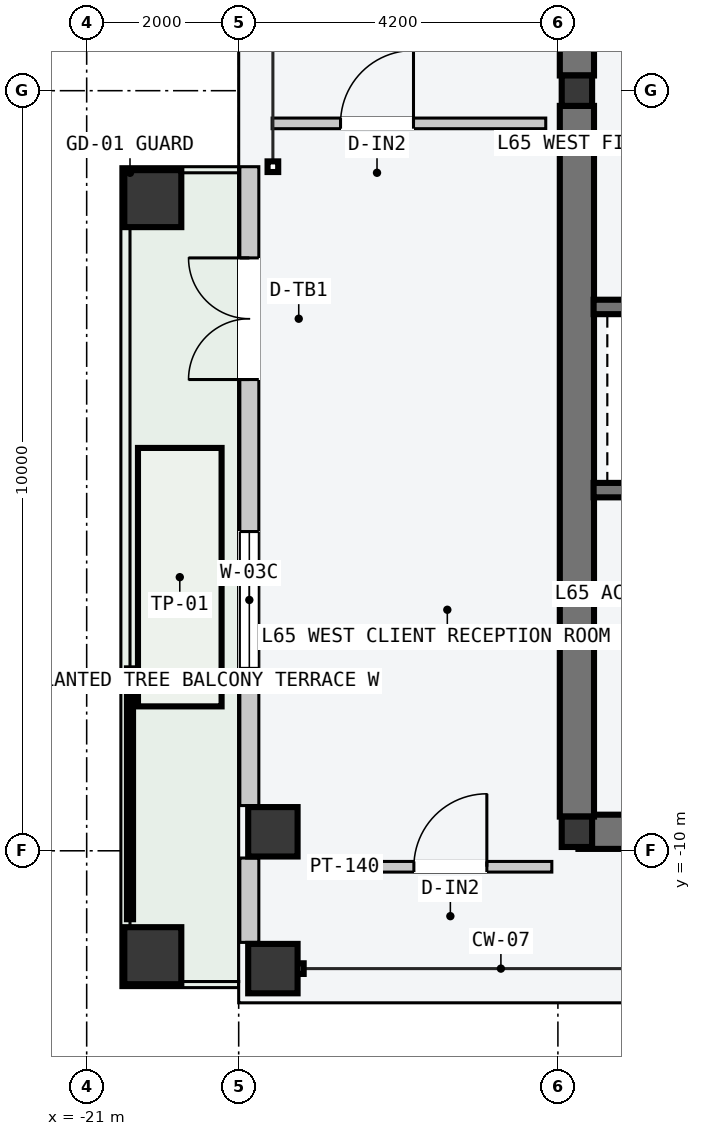
"""IFC4 building model, lengths in metres.
Left out: names, types, materials, properties, quantities, classifications, styles, units other than length and angle.
Written with IfcOpenShell. Run it as: python <this file> out.ifc"""

import sys

from ifc_helpers import new_model, si_unit, direction, frame, frame_2d, origin, origin_2d, place, context, subcontext, project, spatial, rectangle, hollow_rectangle, i_section, extrude, element, fill, save


model = new_model("IFC4")
c1 = context("Model", 3, precision=1e-05, world=origin(), true_north=direction((0.0, 1.0)))
c2 = subcontext(c1, "Body", "Model", "MODEL_VIEW")
j1 = project(units=[si_unit("LENGTHUNIT", "METRE"), si_unit("PLANEANGLEUNIT", "RADIAN")], contexts=[c1])
p1 = place(None, origin())
s1 = spatial("IfcSite", under=j1, at=p1, CompositionType="ELEMENT")
p2 = place(p1, origin())
s2 = spatial("IfcBuilding", under=s1, at=p2, CompositionType="ELEMENT")
p3 = place(p2, frame((0.0, 0.0, 247.2)))
s3 = spatial("IfcBuildingStorey", under=s2, at=p3, CompositionType="ELEMENT", Elevation=247.2)
p4 = place(p3, frame((-14.53, -9.75, -0.2), z_axis=(0.0, 0.0, 1.0), x_axis=(1.0, 0.0, 0.0)))
e1 = element("IfcWall", 1, at=p4, inside=s3, PredefinedType="SHEAR", context=c2, shape_type="SweptSolid", body=[
    extrude(rectangle(XDim=6.46, YDim=0.45, at=frame_2d((3.23, 0.0))), origin(), (0.0, 0.0, 1.0), 3.6),
])
for number, where, z_axis, x_axis in (
    (2, (-14.55, -9.55, -0.2), (0.0, 0.0, 1.0), (0.0, 1.0, 0.0)),
    (3, (-14.55, 0.2, -0.2), (0.0, 0.0, 1.0), (0.0, 1.0, 0.0)),
):
    element("IfcWall", number, at=place(p3, frame(where, z_axis=z_axis, x_axis=x_axis)), inside=s3, PredefinedType="SHEAR", context=c2, shape_type="SweptSolid", body=[
        extrude(rectangle(XDim=9.35, YDim=0.45, at=frame_2d((4.675, 0.0))), origin(), (0.0, 0.0, 1.0), 3.6),
    ])
for number, where, z_axis, x_axis in (
    (4, (-14.55, -9.75, 0.0), (0.0, 0.0, 1.0), (1.0, 0.0, 0.0)),
    (5, (-14.55, 0.0, 0.0), (0.0, 0.0, 1.0), (1.0, 0.0, 0.0)),
):
    element("IfcColumn", number, at=place(p3, frame(where, z_axis=z_axis, x_axis=x_axis)), inside=s3, PredefinedType="COLUMN", context=c2, shape_type="SweptSolid", body=[
        extrude(i_section(OverallWidth=0.4, OverallDepth=0.4, WebThickness=0.013, FlangeThickness=0.021, at=origin_2d()), origin(), (0.0, 0.0, 1.0), 3.6),
    ])
for number, where, z_axis, x_axis in (
    (6, (-18.55, -11.55, 0.0), (0.0, 0.0, 1.0), (0.0, 1.0, 0.0)),
    (7, (-18.55, -9.75, 0.0), (0.0, 0.0, 1.0), (0.0, 1.0, 0.0)),
):
    element("IfcColumn", number, at=place(p3, frame(where, z_axis=z_axis, x_axis=x_axis)), inside=s3, PredefinedType="COLUMN", context=c2, shape_type="SweptSolid", body=[
        extrude(hollow_rectangle(XDim=0.65, YDim=0.65, WallThickness=0.028, at=origin_2d()), origin(), (0.0, 0.0, 1.0), 3.6),
    ])
for number, where, z_axis, x_axis in (
    (8, (-20.13, -11.38, -0.2), (0.0, 0.0, 1.0), (0.0, 1.0, 0.0)),
    (9, (-20.13, -1.42, -0.2), (0.0, 0.0, 1.0), (0.0, 1.0, 0.0)),
):
    element("IfcColumn", number, at=place(p3, frame(where, z_axis=z_axis, x_axis=x_axis)), inside=s3, PredefinedType="COLUMN", context=c2, shape_type="SweptSolid", body=[
        extrude(hollow_rectangle(XDim=0.75, YDim=0.75, WallThickness=0.032, at=origin_2d()), origin(), (0.0, 0.0, 1.0), 3.8),
    ])
p5 = place(p3, frame((-18.86, -11.205, 0.0), z_axis=(0.0, 0.0, 1.0), x_axis=(0.0, 1.0, 0.0)))
e10 = element("IfcWall", 10, at=p5, inside=s3, PredefinedType="STANDARD", context=c2, shape_type="SweptSolid", body=[
    extrude(rectangle(XDim=1.11, YDim=0.25, at=frame_2d((0.555, 0.0))), origin(), (0.0, 0.0, 1.0), 3.4),
])
p6 = place(p3, frame((-18.86, -9.405, 0.0), z_axis=(0.0, 0.0, 1.0), x_axis=(0.0, 1.0, 0.0)))
e11 = element("IfcWall", 11, at=p6, inside=s3, PredefinedType="STANDARD", context=c2, shape_type="SweptSolid", body=[
    extrude(rectangle(XDim=8.405, YDim=0.25, at=frame_2d((4.203, 0.0))), origin(), (0.0, 0.0, 1.0), 3.4),
])
p7 = place(p6, frame((5.605, 0.0, 0.0)))
e12 = element("IfcOpeningElement", 12, at=p7, cuts=e11, PredefinedType="OPENING", context=c2, shape_type="SweptSolid", body=[
    extrude(rectangle(XDim=1.6, YDim=2.2, at=frame_2d((0.8, 1.1))), frame((0.0, 0.135, 0.0), z_axis=(0.0, -1.0, 0.0), x_axis=(1.0, 0.0, 0.0)), (0.0, 0.0, 1.0), 0.27),
])
p8 = place(p6, frame((1.805, 0.0, 0.85)))
e13 = element("IfcOpeningElement", 13, at=p8, cuts=e11, PredefinedType="OPENING", context=c2, shape_type="SweptSolid", body=[
    extrude(rectangle(XDim=1.8, YDim=2.05, at=frame_2d((0.9, 1.025))), frame((0.0, 0.135, 0.0), z_axis=(0.0, -1.0, 0.0), x_axis=(1.0, 0.0, 0.0)), (0.0, 0.0, 1.0), 0.27),
])
p9 = place(p3, frame((-14.33, -2.845, -0.2), z_axis=(0.0, 0.0, 1.0), x_axis=(1.0, 0.0, 0.0)))
e14 = element("IfcWall", 14, at=p9, inside=s3, PredefinedType="SOLIDWALL", context=c2, shape_type="SweptSolid", body=[
    extrude(rectangle(XDim=2.68, YDim=0.19, at=frame_2d((1.34, 0.0))), origin(), (0.0, 0.0, 1.0), 3.6),
])
p10 = place(p9, frame((0.83, 0.0, 0.2)))
e15 = element("IfcOpeningElement", 15, at=p10, cuts=e14, PredefinedType="OPENING", context=c2, shape_type="SweptSolid", body=[
    extrude(rectangle(XDim=1.2, YDim=2.2, at=frame_2d((0.6, 1.1))), frame((0.0, 0.105, 0.0), z_axis=(0.0, -1.0, 0.0), x_axis=(1.0, 0.0, 0.0)), (0.0, 0.0, 1.0), 0.21),
])
p11 = place(p3, frame((-14.33, -5.255, -0.2), z_axis=(0.0, 0.0, 1.0), x_axis=(1.0, 0.0, 0.0)))
e16 = element("IfcWall", 16, at=p11, inside=s3, PredefinedType="SOLIDWALL", context=c2, shape_type="SweptSolid", body=[
    extrude(rectangle(XDim=2.68, YDim=0.19, at=frame_2d((1.34, 0.0))), origin(), (0.0, 0.0, 1.0), 3.6),
])
p12 = place(p3, frame((-17.55, -10.21, 0.0), z_axis=(0.0, 0.0, 1.0), x_axis=(1.0, 0.0, 0.0)))
e17 = element("IfcWall", 17, at=p12, inside=s3, PredefinedType="PARTITIONING", context=c2, shape_type="SweptSolid", body=[
    extrude(rectangle(XDim=2.67, YDim=0.14, at=frame_2d((1.335, 0.0))), origin(), (0.0, 0.0, 1.0), 3.4),
])
p13 = place(p12, frame((0.855, 0.0, 0.0)))
e18 = element("IfcOpeningElement", 18, at=p13, cuts=e17, PredefinedType="OPENING", context=c2, shape_type="SweptSolid", body=[
    extrude(rectangle(XDim=0.96, YDim=2.18, at=frame_2d((0.48, 1.09))), frame((0.0, 0.08, 0.0), z_axis=(0.0, -1.0, 0.0), x_axis=(1.0, 0.0, 0.0)), (0.0, 0.0, 1.0), 0.16),
])
p14 = place(p3, frame((-18.56, -0.43, 0.0), z_axis=(0.0, 0.0, 1.0), x_axis=(1.0, 0.0, 0.0)))
e19 = element("IfcWall", 19, at=p14, inside=s3, PredefinedType="PARTITIONING", context=c2, shape_type="SweptSolid", body=[
    extrude(rectangle(XDim=3.6, YDim=0.14, at=frame_2d((1.8, 0.0))), origin(), (0.0, 0.0, 1.0), 3.4),
])
p15 = place(p14, frame((0.9, 0.0, 0.0)))
e20 = element("IfcOpeningElement", 20, at=p15, cuts=e19, PredefinedType="OPENING", context=c2, shape_type="SweptSolid", body=[
    extrude(rectangle(XDim=0.96, YDim=2.18, at=frame_2d((0.48, 1.09))), frame((0.0, 0.08, 0.0), z_axis=(0.0, -1.0, 0.0), x_axis=(1.0, 0.0, 0.0)), (0.0, 0.0, 1.0), 0.16),
])
p16 = place(p7, origin())
e21 = element("IfcDoor", 21, at=p16, inside=s3, OperationType="DOUBLE_DOOR_SINGLE_SWING", PredefinedType="DOOR", context=c2, shape_type="SweptSolid", body=[
    extrude(rectangle(XDim=1.6, YDim=2.2, at=frame_2d((0.8, 1.1))), frame((0.0, 0.025, 0.0), z_axis=(0.0, -1.0, 0.0), x_axis=(1.0, 0.0, 0.0)), (0.0, 0.0, 1.0), 0.05),
])
fill(e12, e21)
p17 = place(p8, origin())
e22 = element("IfcWindow", 22, at=p17, inside=s3, PartitioningType="SINGLE_PANEL", PredefinedType="WINDOW", context=c2, shape_type="SweptSolid", body=[
    extrude(rectangle(XDim=1.8, YDim=2.05, at=frame_2d((0.9, 1.025))), frame((0.0, 0.03, 0.0), z_axis=(0.0, -1.0, 0.0), x_axis=(1.0, 0.0, 0.0)), (0.0, 0.0, 1.0), 0.06),
])
fill(e13, e22)
p18 = place(p13, origin())
e23 = element("IfcDoor", 23, at=p18, inside=s3, OperationType="SINGLE_SWING_RIGHT", PredefinedType="DOOR", context=c2, shape_type="SweptSolid", body=[
    extrude(rectangle(XDim=0.96, YDim=2.18, at=frame_2d((0.48, 1.09))), frame((0.0, 0.025, 0.0), z_axis=(0.0, -1.0, 0.0), x_axis=(1.0, 0.0, 0.0)), (0.0, 0.0, 1.0), 0.05),
])
fill(e18, e23)
p19 = place(p15, origin())
e24 = element("IfcDoor", 24, at=p19, inside=s3, OperationType="SINGLE_SWING_RIGHT", PredefinedType="DOOR", context=c2, shape_type="SweptSolid", body=[
    extrude(rectangle(XDim=0.96, YDim=2.18, at=frame_2d((0.48, 1.09))), frame((0.0, 0.025, 0.0), z_axis=(0.0, -1.0, 0.0), x_axis=(1.0, 0.0, 0.0)), (0.0, 0.0, 1.0), 0.05),
])
fill(e20, e24)
save(model, sys.argv[1])
